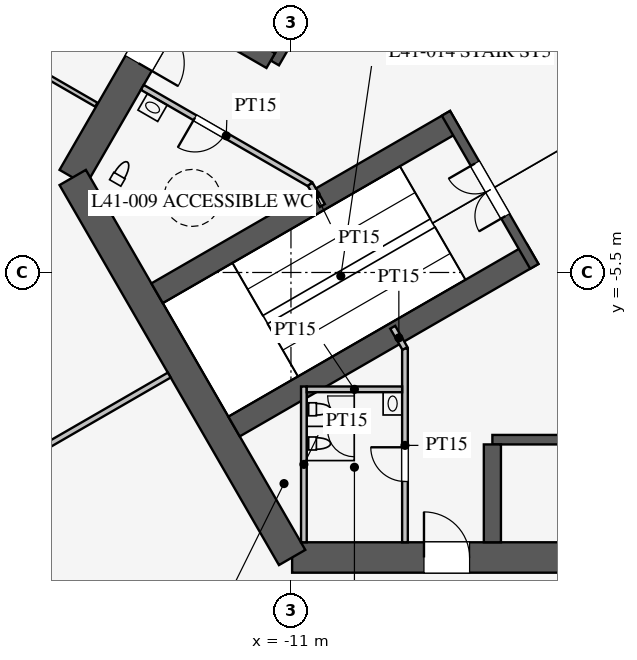
"""IFC4 building model, lengths in metres.
Left out: names, types, materials, properties, quantities, classifications, styles, units other than length and angle.
Written with IfcOpenShell. Run it as: python <this file> out.ifc"""

import sys

from ifc_helpers import new_model, si_unit, direction, frame, frame_2d, origin, place, context, subcontext, project, spatial, rectangle, extrude, element, fill, save


model = new_model("IFC4")
c1 = context("Model", 3, precision=1e-05, world=origin(), true_north=direction((0.0, 1.0)))
c2 = subcontext(c1, "Body", "Model", "MODEL_VIEW")
j1 = project(units=[si_unit("LENGTHUNIT", "METRE"), si_unit("PLANEANGLEUNIT", "RADIAN")], contexts=[c1])
p1 = place(None, origin())
s1 = spatial("IfcSite", under=j1, at=p1, CompositionType="ELEMENT")
p2 = place(p1, origin())
s2 = spatial("IfcBuilding", under=s1, at=p2, CompositionType="ELEMENT")
p3 = place(p2, frame((0.0, 0.0, 178.7)))
s3 = spatial("IfcBuildingStorey", under=s2, at=p3, CompositionType="ELEMENT", Elevation=178.7)
p4 = place(p3, frame((-10.97, -13.0, 0.0), z_axis=(0.0, 0.0, 1.0), x_axis=(1.0, 0.0, 0.0)))
e1 = element("IfcWall", 1, at=p4, inside=s3, PredefinedType="SHEAR", context=c2, shape_type="SweptSolid", body=[
    extrude(rectangle(XDim=21.939, YDim=0.8, at=frame_2d((10.97, 0.0))), origin(), (0.0, 0.0, 1.0), 6.0),
])
p5 = place(p4, frame((17.27, 0.0, 0.0)))
e2 = element("IfcOpeningElement", 2, at=p5, cuts=e1, PredefinedType="OPENING", context=c2, shape_type="SweptSolid", body=[
    extrude(rectangle(XDim=1.2, YDim=2.1, at=frame_2d((0.6, 1.05))), frame((0.0, 0.41, 0.0), z_axis=(0.0, -1.0, 0.0), x_axis=(1.0, 0.0, 0.0)), (0.0, 0.0, 1.0), 0.82),
])
p6 = place(p4, frame((3.47, 0.0, 0.0)))
e3 = element("IfcOpeningElement", 3, at=p6, cuts=e1, PredefinedType="OPENING", context=c2, shape_type="SweptSolid", body=[
    extrude(rectangle(XDim=1.2, YDim=2.1, at=frame_2d((0.6, 1.05))), frame((0.0, 0.41, 0.0), z_axis=(0.0, -1.0, 0.0), x_axis=(1.0, 0.0, 0.0)), (0.0, 0.0, 1.0), 0.82),
])
p7 = place(p3, frame((-5.773, 16.0, 0.0), z_axis=(0.0, 0.0, 1.0), x_axis=(-0.500002442456, -0.866023993627, 0.0)))
e4 = element("IfcWall", 4, at=p7, inside=s3, PredefinedType="SHEAR", context=c2, shape_type="SweptSolid", body=[
    extrude(rectangle(XDim=21.939, YDim=0.8, at=frame_2d((10.97, 0.0))), origin(), (0.0, 0.0, 1.0), 6.0),
])
p8 = place(p7, frame((17.27, 0.0, 0.0)))
e5 = element("IfcOpeningElement", 5, at=p8, cuts=e4, PredefinedType="OPENING", context=c2, shape_type="SweptSolid", body=[
    extrude(rectangle(XDim=1.2, YDim=2.1, at=frame_2d((0.6, 1.05))), frame((0.0, 0.41, 0.0), z_axis=(0.0, -1.0, 0.0), x_axis=(1.0, 0.0, 0.0)), (0.0, 0.0, 1.0), 0.82),
])
p9 = place(p7, frame((3.47, 0.0, 0.0)))
e6 = element("IfcOpeningElement", 6, at=p9, cuts=e4, PredefinedType="OPENING", context=c2, shape_type="SweptSolid", body=[
    extrude(rectangle(XDim=1.2, YDim=2.1, at=frame_2d((0.6, 1.05))), frame((0.0, 0.41, 0.0), z_axis=(0.0, -1.0, 0.0), x_axis=(1.0, 0.0, 0.0)), (0.0, 0.0, 1.0), 0.82),
])
p10 = place(p3, frame((-16.743, -3.0, 0.0), z_axis=(0.0, 0.0, 1.0), x_axis=(0.499995765644, -0.866027848477, 0.0)))
e7 = element("IfcWall", 7, at=p10, inside=s3, PredefinedType="SHEAR", context=c2, shape_type="SweptSolid", body=[
    extrude(rectangle(XDim=11.547, YDim=0.8, at=frame_2d((5.773, 0.0))), origin(), (0.0, 0.0, 1.0), 6.0),
])
p11 = place(p3, frame((-5.7, -9.9, 0.0), z_axis=(0.0, 0.0, 1.0), x_axis=(1.0, 0.0, 0.0)))
e8 = element("IfcWall", 8, at=p11, inside=s3, PredefinedType="SHEAR", context=c2, shape_type="SweptSolid", body=[
    extrude(rectangle(XDim=11.4, YDim=0.25, at=frame_2d((5.7, 0.0))), origin(), (0.0, 0.0, 1.0), 6.0),
])
p12 = place(p3, frame((-5.7, -10.025, 0.0), z_axis=(0.0, 0.0, 1.0), x_axis=(0.0, -1.0, 0.0)))
e9 = element("IfcWall", 9, at=p12, inside=s3, PredefinedType="SHEAR", context=c2, shape_type="SweptSolid", body=[
    extrude(rectangle(XDim=2.575, YDim=0.45, at=frame_2d((1.288, 0.0))), origin(), (0.0, 0.0, 1.0), 6.0),
])
p13 = place(p3, frame((-5.724, 9.886, 0.0), z_axis=(0.0, 0.0, 1.0), x_axis=(-0.500001763848, -0.866024385424, 0.0)))
e10 = element("IfcWall", 10, at=p13, inside=s3, PredefinedType="SHEAR", context=c2, shape_type="SweptSolid", body=[
    extrude(rectangle(XDim=11.4, YDim=0.25, at=frame_2d((5.7, 0.0))), origin(), (0.0, 0.0, 1.0), 6.0),
])
p14 = place(p13, frame((6.525, 0.0, 0.0)))
e11 = element("IfcOpeningElement", 11, at=p14, cuts=e10, PredefinedType="OPENING", context=c2, shape_type="SweptSolid", body=[
    extrude(rectangle(XDim=1.2, YDim=2.2, at=frame_2d((0.6, 1.1))), frame((0.0, 0.135, 0.0), z_axis=(0.0, -1.0, 0.0), x_axis=(1.0, 0.0, 0.0)), (0.0, 0.0, 1.0), 0.27),
])
p15 = place(p13, frame((9.375, 0.0, 0.0)))
e12 = element("IfcOpeningElement", 12, at=p15, cuts=e10, PredefinedType="OPENING", context=c2, shape_type="SweptSolid", body=[
    extrude(rectangle(XDim=1.2, YDim=2.2, at=frame_2d((0.6, 1.1))), frame((0.0, 0.135, 0.0), z_axis=(0.0, -1.0, 0.0), x_axis=(1.0, 0.0, 0.0)), (0.0, 0.0, 1.0), 0.27),
])
p16 = place(p3, frame((-11.532, 0.076, 0.0), z_axis=(0.0, 0.0, 1.0), x_axis=(-0.866005588531, 0.500034319456, 0.0)))
e13 = element("IfcWall", 13, at=p16, inside=s3, PredefinedType="SHEAR", context=c2, shape_type="SweptSolid", body=[
    extrude(rectangle(XDim=2.575, YDim=0.45, at=frame_2d((1.288, 0.0))), origin(), (0.0, 0.0, 1.0), 6.0),
])
for number, where, z_axis, x_axis in (
    (14, (-6.663, -1.509, 0.0), (0.0, 0.0, 1.0), (-0.866, -0.5, 0.0)),
    (15, (-4.638, -5.016, 0.0), (0.0, 0.0, 1.0), (-0.866, -0.5, 0.0)),
):
    element("IfcWall", number, at=place(p3, frame(where, z_axis=z_axis, x_axis=x_axis)), inside=s3, PredefinedType="SHEAR", context=c2, shape_type="SweptSolid", body=[
        extrude(rectangle(XDim=9.075, YDim=0.6, at=frame_2d((4.538, 0.0))), origin(), (0.0, 0.0, 1.0), 6.0),
    ])
p17 = place(p3, frame((-6.922, -1.312, 0.0), z_axis=(0.0, 0.0, 1.0), x_axis=(0.499984536904, -0.866034331223, 0.0)))
e16 = element("IfcWall", 16, at=p17, inside=s3, PredefinedType="SHEAR", context=c2, shape_type="SweptSolid", body=[
    extrude(rectangle(XDim=4.65, YDim=0.25, at=frame_2d((2.325, 0.0))), origin(), (0.0, 0.0, 1.0), 6.0),
])
p18 = place(p17, frame((1.525, 0.0, 0.0)))
e17 = element("IfcOpeningElement", 17, at=p18, cuts=e16, PredefinedType="OPENING", context=c2, shape_type="SweptSolid", body=[
    extrude(rectangle(XDim=1.6, YDim=2.1, at=frame_2d((0.8, 1.05))), frame((0.0, 0.135, 0.0), z_axis=(0.0, -1.0, 0.0), x_axis=(1.0, 0.0, 0.0)), (0.0, 0.0, 1.0), 0.27),
])
p19 = place(p3, frame((-8.0, -7.5, 0.0), z_axis=(0.0, 0.0, 1.0), x_axis=(0.0, -1.0, 0.0)))
e18 = element("IfcWall", 18, at=p19, inside=s3, PredefinedType="PARTITIONING", context=c2, shape_type="SweptSolid", body=[
    extrude(rectangle(XDim=5.1, YDim=0.15, at=frame_2d((2.55, 0.0))), origin(), (0.0, 0.0, 1.0), 5.8),
])
p20 = place(p19, frame((2.6, 0.0, 0.0)))
e19 = element("IfcOpeningElement", 19, at=p20, cuts=e18, PredefinedType="OPENING", context=c2, shape_type="SweptSolid", body=[
    extrude(rectangle(XDim=0.9, YDim=2.1, at=frame_2d((0.45, 1.05))), frame((0.0, 0.085, 0.0), z_axis=(0.0, -1.0, 0.0), x_axis=(1.0, 0.0, 0.0)), (0.0, 0.0, 1.0), 0.17),
])
p21 = place(p3, frame((-10.495, -3.178, 0.0), z_axis=(0.0, 0.0, 1.0), x_axis=(-0.86602216432, 0.500005610874, 0.0)))
e20 = element("IfcWall", 20, at=p21, inside=s3, PredefinedType="PARTITIONING", context=c2, shape_type="SweptSolid", body=[
    extrude(rectangle(XDim=5.1, YDim=0.15, at=frame_2d((2.55, 0.0))), origin(), (0.0, 0.0, 1.0), 5.8),
])
p22 = place(p21, frame((2.6, 0.0, 0.0)))
e21 = element("IfcOpeningElement", 21, at=p22, cuts=e20, PredefinedType="OPENING", context=c2, shape_type="SweptSolid", body=[
    extrude(rectangle(XDim=0.9, YDim=2.1, at=frame_2d((0.45, 1.05))), frame((0.0, 0.085, 0.0), z_axis=(0.0, -1.0, 0.0), x_axis=(1.0, 0.0, 0.0)), (0.0, 0.0, 1.0), 0.17),
])
for number, where, z_axis, x_axis in (
    (22, (-10.495, -3.178, 0.0), (0.0, 0.0, 1.0), (0.5, -0.866, 0.0)),
    (23, (-8.0, -7.5, 0.0), (0.0, 0.0, 1.0), (-0.5, 0.866, 0.0)),
):
    element("IfcWall", number, at=place(p3, frame(where, z_axis=z_axis, x_axis=x_axis)), inside=s3, PredefinedType="PARTITIONING", context=c2, shape_type="SweptSolid", body=[
        extrude(rectangle(XDim=0.645, YDim=0.15, at=frame_2d((0.323, 0.0))), origin(), (0.0, 0.0, 1.0), 5.8),
    ])
p23 = place(p3, frame((-10.66, -8.5, 0.0), z_axis=(0.0, 0.0, 1.0), x_axis=(0.0, -1.0, 0.0)))
e24 = element("IfcWall", 24, at=p23, inside=s3, PredefinedType="PARTITIONING", context=c2, shape_type="SweptSolid", body=[
    extrude(rectangle(XDim=4.1, YDim=0.15, at=frame_2d((2.05, 0.0))), origin(), (0.0, 0.0, 1.0), 5.8),
])
p24 = place(p3, frame((-8.075, -8.575, 0.0), z_axis=(0.0, 0.0, 1.0), x_axis=(-1.0, 0.0, 0.0)))
e25 = element("IfcWall", 25, at=p24, inside=s3, PredefinedType="PARTITIONING", context=c2, shape_type="SweptSolid", body=[
    extrude(rectangle(XDim=2.51, YDim=0.15, at=frame_2d((1.255, 0.0))), origin(), (0.0, 0.0, 1.0), 5.8),
])
p25 = place(p3, frame((-14.203, -8.2, 0.0), z_axis=(0.0, 0.0, 1.0), x_axis=(-0.866021600284, -0.500006587798, 0.0)))
e26 = element("IfcWall", 26, at=p25, inside=s3, PredefinedType="PARTITIONING", context=c2, shape_type="SweptSolid", body=[
    extrude(rectangle(XDim=14.95, YDim=0.15, at=frame_2d((7.475, 0.0))), origin(), (0.0, 0.0, 1.0), 4.2),
])
p26 = place(p3, frame((-16.122, -1.084, 0.0), z_axis=(0.0, 0.0, 1.0), x_axis=(-0.866025583565, 0.49999968861, 0.0)))
e27 = element("IfcWall", 27, at=p26, inside=s3, PredefinedType="PARTITIONING", context=c2, shape_type="SweptSolid", body=[
    extrude(rectangle(XDim=10.393, YDim=0.12, at=frame_2d((5.196, 0.0))), origin(), (0.0, 0.0, 1.0), 2.9),
])
p27 = place(p26, frame((2.35, 0.0, 0.0)))
e28 = element("IfcOpeningElement", 28, at=p27, cuts=e27, PredefinedType="OPENING", context=c2, shape_type="SweptSolid", body=[
    extrude(rectangle(XDim=0.9, YDim=2.1, at=frame_2d((0.45, 1.05))), frame((0.0, 0.07, 0.0), z_axis=(0.0, -1.0, 0.0), x_axis=(1.0, 0.0, 0.0)), (0.0, 0.0, 1.0), 0.14),
])
p28 = place(p20, frame((0.9, 0.0, 0.0), z_axis=(0.0, 0.0, 1.0), x_axis=(-1.0, 0.0, 0.0)))
e29 = element("IfcDoor", 29, at=p28, inside=s3, OperationType="SINGLE_SWING_RIGHT", PredefinedType="DOOR", context=c2, shape_type="SweptSolid", body=[
    extrude(rectangle(XDim=0.9, YDim=2.1, at=frame_2d((0.45, 1.05))), frame((0.0, 0.025, 0.0), z_axis=(0.0, -1.0, 0.0), x_axis=(1.0, 0.0, 0.0)), (0.0, 0.0, 1.0), 0.05),
])
fill(e19, e29)
p29 = place(p22, origin())
e30 = element("IfcDoor", 30, at=p29, inside=s3, OperationType="SINGLE_SWING_RIGHT", PredefinedType="DOOR", context=c2, shape_type="SweptSolid", body=[
    extrude(rectangle(XDim=0.9, YDim=2.1, at=frame_2d((0.45, 1.05))), frame((0.0, 0.025, 0.0), z_axis=(0.0, -1.0, 0.0), x_axis=(1.0, 0.0, 0.0)), (0.0, 0.0, 1.0), 0.05),
])
fill(e21, e30)
p30 = place(p18, frame((1.6, 0.0, 0.0), z_axis=(0.0, 0.0, 1.0), x_axis=(-1.0, 0.0, 0.0)))
e31 = element("IfcDoor", 31, at=p30, inside=s3, OperationType="DOUBLE_DOOR_SINGLE_SWING", PredefinedType="DOOR", context=c2, shape_type="SweptSolid", body=[
    extrude(rectangle(XDim=1.6, YDim=2.1, at=frame_2d((0.8, 1.05))), frame((0.0, 0.025, 0.0), z_axis=(0.0, -1.0, 0.0), x_axis=(1.0, 0.0, 0.0)), (0.0, 0.0, 1.0), 0.05),
])
fill(e17, e31)
p31 = place(p6, origin())
e32 = element("IfcDoor", 32, at=p31, inside=s3, OperationType="SINGLE_SWING_LEFT", PredefinedType="DOOR", context=c2, shape_type="SweptSolid", body=[
    extrude(rectangle(XDim=1.2, YDim=2.1, at=frame_2d((0.6, 1.05))), frame((0.0, 0.025, 0.0), z_axis=(0.0, -1.0, 0.0), x_axis=(1.0, 0.0, 0.0)), (0.0, 0.0, 1.0), 0.05),
])
fill(e3, e32)
p32 = place(p8, origin())
e33 = element("IfcDoor", 33, at=p32, inside=s3, OperationType="SINGLE_SWING_RIGHT", PredefinedType="DOOR", context=c2, shape_type="SweptSolid", body=[
    extrude(rectangle(XDim=1.2, YDim=2.1, at=frame_2d((0.6, 1.05))), frame((0.0, 0.025, 0.0), z_axis=(0.0, -1.0, 0.0), x_axis=(1.0, 0.0, 0.0)), (0.0, 0.0, 1.0), 0.05),
])
fill(e5, e33)
save(model, sys.argv[1])
